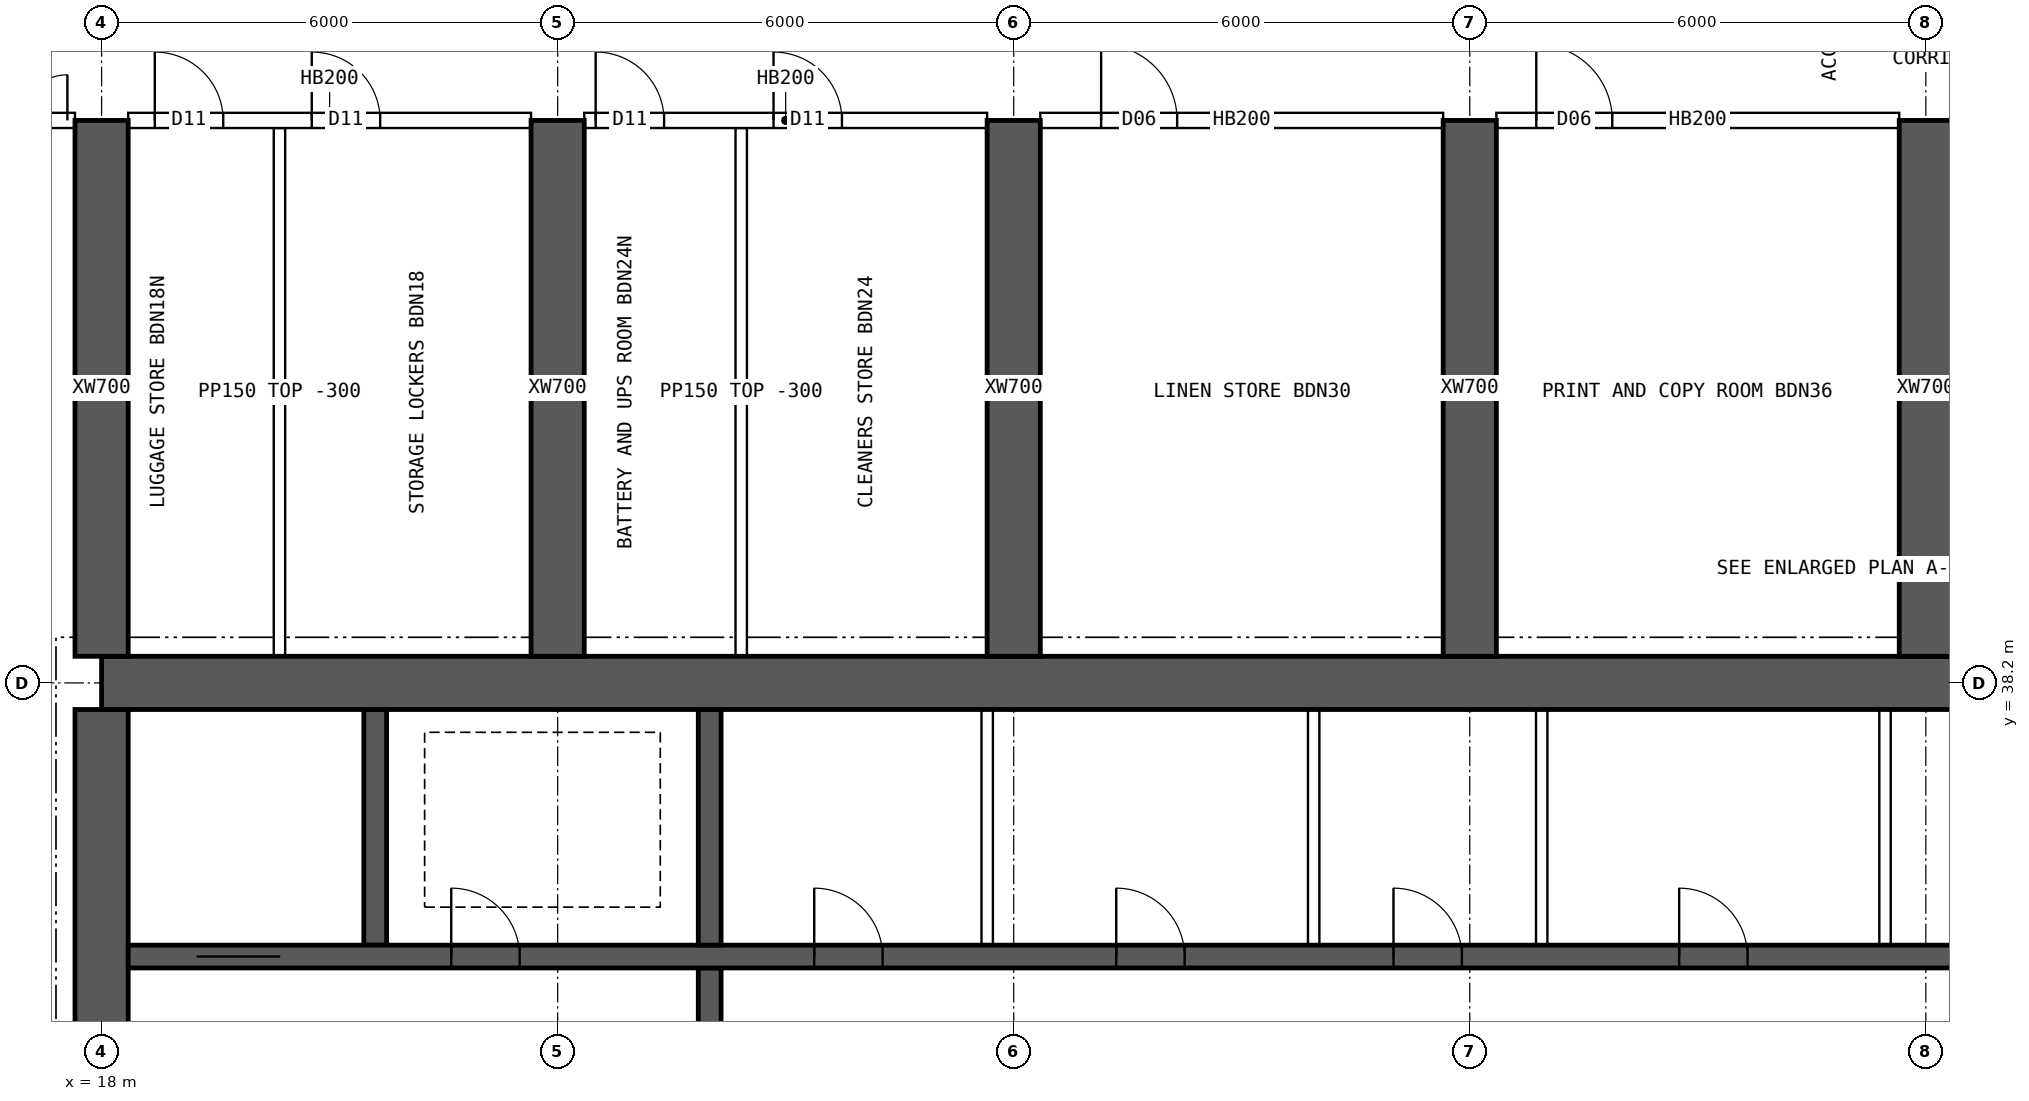
"""IFC4 building model, lengths in metres.
Left out: names, types, materials, properties, quantities, classifications, styles, units other than length and angle.
Written with IfcOpenShell. Run it as: python <this file> out.ifc"""

import sys

from ifc_helpers import new_model, si_unit, direction, frame, frame_2d, origin, place, context, subcontext, project, spatial, rectangle, extrude, element, fill, save


model = new_model("IFC4")
c1 = context("Model", 3, precision=1e-05, world=origin(), true_north=direction((0.0, 1.0)))
c2 = subcontext(c1, "Body", "Model", "MODEL_VIEW")
j1 = project(units=[si_unit("LENGTHUNIT", "METRE"), si_unit("PLANEANGLEUNIT", "RADIAN")], contexts=[c1])
p1 = place(None, origin())
s1 = spatial("IfcSite", under=j1, at=p1, CompositionType="ELEMENT")
p2 = place(p1, origin())
s2 = spatial("IfcBuilding", under=s1, at=p2, CompositionType="ELEMENT")
p3 = place(p2, frame((0.0, 0.0, 254.05)))
s3 = spatial("IfcBuildingStorey", under=s2, at=p3, CompositionType="ELEMENT", Elevation=254.05)
p4 = place(p3, frame((18.0, 38.2, 0.0), z_axis=(0.0, 0.0, 1.0), x_axis=(1.0, 0.0, 0.0)))
e1 = element("IfcWall", 1, at=p4, inside=s3, PredefinedType="SHEAR", context=c2, shape_type="SweptSolid", body=[
    extrude(rectangle(XDim=48.0, YDim=0.7, at=frame_2d((24.0, 0.0))), origin(), (0.0, 0.0, 1.0), 3.75),
])
p5 = place(p3, frame((18.0, 26.15, 0.0), z_axis=(0.0, 0.0, 1.0), x_axis=(0.0, 1.0, 0.0)))
e2 = element("IfcWall", 2, at=p5, inside=s3, PredefinedType="SHEAR", context=c2, shape_type="SweptSolid", body=[
    extrude(rectangle(XDim=11.7, YDim=0.7, at=frame_2d((5.85, 0.0))), origin(), (0.0, 0.0, 1.0), 3.75),
])
p6 = place(p5, frame((5.15, 0.0, 0.0)))
e3 = element("IfcOpeningElement", 3, at=p6, cuts=e2, PredefinedType="OPENING", context=c2, shape_type="SweptSolid", body=[
    extrude(rectangle(XDim=1.2, YDim=2.1, at=frame_2d((0.6, 1.05))), frame((0.0, 0.36, 0.0), z_axis=(0.0, -1.0, 0.0), x_axis=(1.0, 0.0, 0.0)), (0.0, 0.0, 1.0), 0.72),
])
p7 = place(p3, frame((18.35, 34.6, 0.0), z_axis=(0.0, 0.0, 1.0), x_axis=(1.0, 0.0, 0.0)))
e4 = element("IfcWall", 4, at=p7, inside=s3, PredefinedType="SHEAR", context=c2, shape_type="SweptSolid", body=[
    extrude(rectangle(XDim=47.3, YDim=0.3, at=frame_2d((23.65, 0.0))), origin(), (0.0, 0.0, 1.0), 3.75),
])
p8 = place(p7, frame((0.9, 0.0, 0.0)))
e5 = element("IfcOpeningElement", 5, at=p8, cuts=e4, PredefinedType="OPENING", context=c2, shape_type="SweptSolid", body=[
    extrude(rectangle(XDim=1.1, YDim=2.1, at=frame_2d((0.55, 1.05))), frame((0.0, 0.16, 0.0), z_axis=(0.0, -1.0, 0.0), x_axis=(1.0, 0.0, 0.0)), (0.0, 0.0, 1.0), 0.32),
])
p9 = place(p7, frame((45.3, 0.0, 0.0)))
e6 = element("IfcOpeningElement", 6, at=p9, cuts=e4, PredefinedType="OPENING", context=c2, shape_type="SweptSolid", body=[
    extrude(rectangle(XDim=1.1, YDim=2.1, at=frame_2d((0.55, 1.05))), frame((0.0, 0.16, 0.0), z_axis=(0.0, -1.0, 0.0), x_axis=(1.0, 0.0, 0.0)), (0.0, 0.0, 1.0), 0.32),
])
p10 = place(p7, frame((4.25, 0.0, 0.0)))
e7 = element("IfcOpeningElement", 7, at=p10, cuts=e4, PredefinedType="OPENING", context=c2, shape_type="SweptSolid", body=[
    extrude(rectangle(XDim=0.9, YDim=2.1, at=frame_2d((0.45, 1.05))), frame((0.0, 0.16, 0.0), z_axis=(0.0, -1.0, 0.0), x_axis=(1.0, 0.0, 0.0)), (0.0, 0.0, 1.0), 0.32),
])
p11 = place(p7, frame((42.15, 0.0, 0.0)))
e8 = element("IfcOpeningElement", 8, at=p11, cuts=e4, PredefinedType="OPENING", context=c2, shape_type="SweptSolid", body=[
    extrude(rectangle(XDim=0.9, YDim=2.1, at=frame_2d((0.45, 1.05))), frame((0.0, 0.16, 0.0), z_axis=(0.0, -1.0, 0.0), x_axis=(1.0, 0.0, 0.0)), (0.0, 0.0, 1.0), 0.32),
])
p12 = place(p7, frame((9.025, 0.0, 0.0)))
e9 = element("IfcOpeningElement", 9, at=p12, cuts=e4, PredefinedType="OPENING", context=c2, shape_type="SweptSolid", body=[
    extrude(rectangle(XDim=0.9, YDim=2.1, at=frame_2d((0.45, 1.05))), frame((0.0, 0.16, 0.0), z_axis=(0.0, -1.0, 0.0), x_axis=(1.0, 0.0, 0.0)), (0.0, 0.0, 1.0), 0.32),
])
p13 = place(p7, frame((12.999, 0.0, 0.0)))
e10 = element("IfcOpeningElement", 10, at=p13, cuts=e4, PredefinedType="OPENING", context=c2, shape_type="SweptSolid", body=[
    extrude(rectangle(XDim=0.9, YDim=2.1, at=frame_2d((0.45, 1.05))), frame((0.0, 0.16, 0.0), z_axis=(0.0, -1.0, 0.0), x_axis=(1.0, 0.0, 0.0)), (0.0, 0.0, 1.0), 0.32),
])
p14 = place(p7, frame((16.646, 0.0, 0.0)))
e11 = element("IfcOpeningElement", 11, at=p14, cuts=e4, PredefinedType="OPENING", context=c2, shape_type="SweptSolid", body=[
    extrude(rectangle(XDim=0.9, YDim=2.1, at=frame_2d((0.45, 1.05))), frame((0.0, 0.16, 0.0), z_axis=(0.0, -1.0, 0.0), x_axis=(1.0, 0.0, 0.0)), (0.0, 0.0, 1.0), 0.32),
])
p15 = place(p7, frame((20.405, 0.0, 0.0)))
e12 = element("IfcOpeningElement", 12, at=p15, cuts=e4, PredefinedType="OPENING", context=c2, shape_type="SweptSolid", body=[
    extrude(rectangle(XDim=0.9, YDim=2.1, at=frame_2d((0.45, 1.05))), frame((0.0, 0.16, 0.0), z_axis=(0.0, -1.0, 0.0), x_axis=(1.0, 0.0, 0.0)), (0.0, 0.0, 1.0), 0.32),
])
p16 = place(p7, frame((24.811, 0.0, 0.0)))
e13 = element("IfcOpeningElement", 13, at=p16, cuts=e4, PredefinedType="OPENING", context=c2, shape_type="SweptSolid", body=[
    extrude(rectangle(XDim=0.9, YDim=2.1, at=frame_2d((0.45, 1.05))), frame((0.0, 0.16, 0.0), z_axis=(0.0, -1.0, 0.0), x_axis=(1.0, 0.0, 0.0)), (0.0, 0.0, 1.0), 0.32),
])
p17 = place(p7, frame((27.608, 0.0, 0.0)))
e14 = element("IfcOpeningElement", 14, at=p17, cuts=e4, PredefinedType="OPENING", context=c2, shape_type="SweptSolid", body=[
    extrude(rectangle(XDim=0.9, YDim=2.1, at=frame_2d((0.45, 1.05))), frame((0.0, 0.16, 0.0), z_axis=(0.0, -1.0, 0.0), x_axis=(1.0, 0.0, 0.0)), (0.0, 0.0, 1.0), 0.32),
])
p18 = place(p7, frame((29.981, 0.0, 0.0)))
e15 = element("IfcOpeningElement", 15, at=p18, cuts=e4, PredefinedType="OPENING", context=c2, shape_type="SweptSolid", body=[
    extrude(rectangle(XDim=0.9, YDim=2.1, at=frame_2d((0.45, 1.05))), frame((0.0, 0.16, 0.0), z_axis=(0.0, -1.0, 0.0), x_axis=(1.0, 0.0, 0.0)), (0.0, 0.0, 1.0), 0.32),
])
p19 = place(p7, frame((35.451, 0.0, 0.0)))
e16 = element("IfcOpeningElement", 16, at=p19, cuts=e4, PredefinedType="OPENING", context=c2, shape_type="SweptSolid", body=[
    extrude(rectangle(XDim=0.9, YDim=2.1, at=frame_2d((0.45, 1.05))), frame((0.0, 0.16, 0.0), z_axis=(0.0, -1.0, 0.0), x_axis=(1.0, 0.0, 0.0)), (0.0, 0.0, 1.0), 0.32),
])
p20 = place(p3, frame((26.0, 30.55, 0.0), z_axis=(0.0, 0.0, 1.0), x_axis=(0.0, 1.0, 0.0)))
e17 = element("IfcWall", 17, at=p20, inside=s3, PredefinedType="SHEAR", context=c2, shape_type="SweptSolid", body=[
    extrude(rectangle(XDim=3.9, YDim=0.3, at=frame_2d((1.95, 0.0))), origin(), (0.0, 0.0, 1.0), 3.75),
])
p21 = place(p20, frame((1.4, 0.0, 0.0)))
e18 = element("IfcOpeningElement", 18, at=p21, cuts=e17, PredefinedType="OPENING", context=c2, shape_type="SweptSolid", body=[
    extrude(rectangle(XDim=1.2, YDim=2.1, at=frame_2d((0.6, 1.05))), frame((0.0, 0.16, 0.0), z_axis=(0.0, -1.0, 0.0), x_axis=(1.0, 0.0, 0.0)), (0.0, 0.0, 1.0), 0.32),
])
for number, where, z_axis, x_axis in (
    (19, (21.6, 34.75, 0.0), (0.0, 0.0, 1.0), (0.0, 1.0, 0.0)),
    (20, (26.0, 34.75, 0.0), (0.0, 0.0, 1.0), (0.0, 1.0, 0.0)),
):
    element("IfcWall", number, at=place(p3, frame(where, z_axis=z_axis, x_axis=x_axis)), inside=s3, PredefinedType="SHEAR", context=c2, shape_type="SweptSolid", body=[
        extrude(rectangle(XDim=3.1, YDim=0.3, at=frame_2d((1.55, 0.0))), origin(), (0.0, 0.0, 1.0), 3.75),
    ])
for number, where, z_axis, x_axis in (
    (21, (18.0, 38.55, 0.0), (0.0, 0.0, 1.0), (0.0, 1.0, 0.0)),
    (22, (24.0, 38.55, 0.0), (0.0, 0.0, 1.0), (0.0, 1.0, 0.0)),
    (23, (30.0, 38.55, 0.0), (0.0, 0.0, 1.0), (0.0, 1.0, 0.0)),
    (24, (36.0, 38.55, 0.0), (0.0, 0.0, 1.0), (0.0, 1.0, 0.0)),
    (25, (42.0, 38.55, 0.0), (0.0, 0.0, 1.0), (0.0, 1.0, 0.0)),
):
    element("IfcWall", number, at=place(p3, frame(where, z_axis=z_axis, x_axis=x_axis)), inside=s3, PredefinedType="SHEAR", context=c2, shape_type="SweptSolid", body=[
        extrude(rectangle(XDim=7.05, YDim=0.7, at=frame_2d((3.525, 0.0))), origin(), (0.0, 0.0, 1.0), 3.75),
    ])
for number, where, z_axis, x_axis in (
    (26, (29.651, 34.75, 0.0), (0.0, 0.0, 1.0), (0.0, 1.0, 0.0)),
    (27, (33.946, 34.75, 0.0), (0.0, 0.0, 1.0), (0.0, 1.0, 0.0)),
    (28, (36.946, 34.75, 0.0), (0.0, 0.0, 1.0), (0.0, 1.0, 0.0)),
    (29, (41.463, 34.75, 0.0), (0.0, 0.0, 1.0), (0.0, 1.0, 0.0)),
):
    element("IfcWall", number, at=place(p3, frame(where, z_axis=z_axis, x_axis=x_axis)), inside=s3, PredefinedType="SOLIDWALL", context=c2, shape_type="SweptSolid", body=[
        extrude(rectangle(XDim=3.1, YDim=0.15, at=frame_2d((1.55, 0.0))), origin(), (0.0, 0.0, 1.0), 3.45),
    ])
p22 = place(p3, frame((15.6, 45.6, 0.0), z_axis=(0.0, 0.0, 1.0), x_axis=(1.0, 0.0, 0.0)))
e30 = element("IfcWall", 30, at=p22, inside=s3, PredefinedType="SOLIDWALL", context=c2, shape_type="SweptSolid", body=[
    extrude(rectangle(XDim=2.05, YDim=0.2, at=frame_2d((1.025, 0.0))), origin(), (0.0, 0.0, 1.0), 3.45),
])
p23 = place(p22, frame((0.75, 0.0, 0.0)))
e31 = element("IfcOpeningElement", 31, at=p23, cuts=e30, PredefinedType="OPENING", context=c2, shape_type="SweptSolid", body=[
    extrude(rectangle(XDim=1.2, YDim=2.1, at=frame_2d((0.6, 1.05))), frame((0.0, 0.11, 0.0), z_axis=(0.0, -1.0, 0.0), x_axis=(1.0, 0.0, 0.0)), (0.0, 0.0, 1.0), 0.22),
])
p24 = place(p3, frame((18.35, 45.6, 0.0), z_axis=(0.0, 0.0, 1.0), x_axis=(1.0, 0.0, 0.0)))
e32 = element("IfcWall", 32, at=p24, inside=s3, PredefinedType="SOLIDWALL", context=c2, shape_type="SweptSolid", body=[
    extrude(rectangle(XDim=5.3, YDim=0.2, at=frame_2d((2.65, 0.0))), origin(), (0.0, 0.0, 1.0), 3.45),
])
p25 = place(p24, frame((0.35, 0.0, 0.0)))
e33 = element("IfcOpeningElement", 33, at=p25, cuts=e32, PredefinedType="OPENING", context=c2, shape_type="SweptSolid", body=[
    extrude(rectangle(XDim=0.9, YDim=2.1, at=frame_2d((0.45, 1.05))), frame((0.0, 0.11, 0.0), z_axis=(0.0, -1.0, 0.0), x_axis=(1.0, 0.0, 0.0)), (0.0, 0.0, 1.0), 0.22),
])
p26 = place(p24, frame((2.415, 0.0, 0.0)))
e34 = element("IfcOpeningElement", 34, at=p26, cuts=e32, PredefinedType="OPENING", context=c2, shape_type="SweptSolid", body=[
    extrude(rectangle(XDim=0.9, YDim=2.1, at=frame_2d((0.45, 1.05))), frame((0.0, 0.11, 0.0), z_axis=(0.0, -1.0, 0.0), x_axis=(1.0, 0.0, 0.0)), (0.0, 0.0, 1.0), 0.22),
])
p27 = place(p3, frame((24.35, 45.6, 0.0), z_axis=(0.0, 0.0, 1.0), x_axis=(1.0, 0.0, 0.0)))
e35 = element("IfcWall", 35, at=p27, inside=s3, PredefinedType="SOLIDWALL", context=c2, shape_type="SweptSolid", body=[
    extrude(rectangle(XDim=5.3, YDim=0.2, at=frame_2d((2.65, 0.0))), origin(), (0.0, 0.0, 1.0), 3.45),
])
p28 = place(p27, frame((0.15, 0.0, 0.0)))
e36 = element("IfcOpeningElement", 36, at=p28, cuts=e35, PredefinedType="OPENING", context=c2, shape_type="SweptSolid", body=[
    extrude(rectangle(XDim=0.9, YDim=2.1, at=frame_2d((0.45, 1.05))), frame((0.0, 0.11, 0.0), z_axis=(0.0, -1.0, 0.0), x_axis=(1.0, 0.0, 0.0)), (0.0, 0.0, 1.0), 0.22),
])
p29 = place(p27, frame((2.49, 0.0, 0.0)))
e37 = element("IfcOpeningElement", 37, at=p29, cuts=e35, PredefinedType="OPENING", context=c2, shape_type="SweptSolid", body=[
    extrude(rectangle(XDim=0.9, YDim=2.1, at=frame_2d((0.45, 1.05))), frame((0.0, 0.11, 0.0), z_axis=(0.0, -1.0, 0.0), x_axis=(1.0, 0.0, 0.0)), (0.0, 0.0, 1.0), 0.22),
])
p30 = place(p3, frame((30.35, 45.6, 0.0), z_axis=(0.0, 0.0, 1.0), x_axis=(1.0, 0.0, 0.0)))
e38 = element("IfcWall", 38, at=p30, inside=s3, PredefinedType="SOLIDWALL", context=c2, shape_type="SweptSolid", body=[
    extrude(rectangle(XDim=5.3, YDim=0.2, at=frame_2d((2.65, 0.0))), origin(), (0.0, 0.0, 1.0), 3.45),
])
p31 = place(p30, frame((0.8, 0.0, 0.0)))
e39 = element("IfcOpeningElement", 39, at=p31, cuts=e38, PredefinedType="OPENING", context=c2, shape_type="SweptSolid", body=[
    extrude(rectangle(XDim=1.0, YDim=2.1, at=frame_2d((0.5, 1.05))), frame((0.0, 0.11, 0.0), z_axis=(0.0, -1.0, 0.0), x_axis=(1.0, 0.0, 0.0)), (0.0, 0.0, 1.0), 0.22),
])
p32 = place(p3, frame((36.35, 45.6, 0.0), z_axis=(0.0, 0.0, 1.0), x_axis=(1.0, 0.0, 0.0)))
e40 = element("IfcWall", 40, at=p32, inside=s3, PredefinedType="SOLIDWALL", context=c2, shape_type="SweptSolid", body=[
    extrude(rectangle(XDim=5.3, YDim=0.2, at=frame_2d((2.65, 0.0))), origin(), (0.0, 0.0, 1.0), 3.45),
])
p33 = place(p32, frame((0.525, 0.0, 0.0)))
e41 = element("IfcOpeningElement", 41, at=p33, cuts=e40, PredefinedType="OPENING", context=c2, shape_type="SweptSolid", body=[
    extrude(rectangle(XDim=1.0, YDim=2.1, at=frame_2d((0.5, 1.05))), frame((0.0, 0.11, 0.0), z_axis=(0.0, -1.0, 0.0), x_axis=(1.0, 0.0, 0.0)), (0.0, 0.0, 1.0), 0.22),
])
for number, where, z_axis, x_axis in (
    (42, (20.34, 38.55, 0.0), (0.0, 0.0, 1.0), (0.0, 1.0, 0.0)),
    (43, (26.415, 38.55, 0.0), (0.0, 0.0, 1.0), (0.0, 1.0, 0.0)),
):
    element("IfcWall", number, at=place(p3, frame(where, z_axis=z_axis, x_axis=x_axis)), inside=s3, PredefinedType="PARTITIONING", context=c2, shape_type="SweptSolid", body=[
        extrude(rectangle(XDim=6.95, YDim=0.15, at=frame_2d((3.475, 0.0))), origin(), (0.0, 0.0, 1.0), 3.45),
    ])
p34 = place(p8, origin())
e44 = element("IfcDoor", 44, at=p34, inside=s3, OperationType="DOUBLE_DOOR_SLIDING", PredefinedType="DOOR", context=c2, shape_type="SweptSolid", body=[
    extrude(rectangle(XDim=1.1, YDim=2.1, at=frame_2d((0.55, 1.05))), frame((0.0, 0.025, 0.0), z_axis=(0.0, -1.0, 0.0), x_axis=(1.0, 0.0, 0.0)), (0.0, 0.0, 1.0), 0.05),
])
fill(e5, e44)
p35 = place(p10, origin())
e45 = element("IfcDoor", 45, at=p35, inside=s3, OperationType="SINGLE_SWING_LEFT", PredefinedType="DOOR", context=c2, shape_type="SweptSolid", body=[
    extrude(rectangle(XDim=0.9, YDim=2.1, at=frame_2d((0.45, 1.05))), frame((0.0, 0.025, 0.0), z_axis=(0.0, -1.0, 0.0), x_axis=(1.0, 0.0, 0.0)), (0.0, 0.0, 1.0), 0.05),
])
fill(e7, e45)
p36 = place(p12, origin())
e46 = element("IfcDoor", 46, at=p36, inside=s3, OperationType="SINGLE_SWING_LEFT", PredefinedType="DOOR", context=c2, shape_type="SweptSolid", body=[
    extrude(rectangle(XDim=0.9, YDim=2.1, at=frame_2d((0.45, 1.05))), frame((0.0, 0.025, 0.0), z_axis=(0.0, -1.0, 0.0), x_axis=(1.0, 0.0, 0.0)), (0.0, 0.0, 1.0), 0.05),
])
fill(e9, e46)
p37 = place(p13, origin())
e47 = element("IfcDoor", 47, at=p37, inside=s3, OperationType="SINGLE_SWING_LEFT", PredefinedType="DOOR", context=c2, shape_type="SweptSolid", body=[
    extrude(rectangle(XDim=0.9, YDim=2.1, at=frame_2d((0.45, 1.05))), frame((0.0, 0.025, 0.0), z_axis=(0.0, -1.0, 0.0), x_axis=(1.0, 0.0, 0.0)), (0.0, 0.0, 1.0), 0.05),
])
fill(e10, e47)
p38 = place(p14, origin())
e48 = element("IfcDoor", 48, at=p38, inside=s3, OperationType="SINGLE_SWING_LEFT", PredefinedType="DOOR", context=c2, shape_type="SweptSolid", body=[
    extrude(rectangle(XDim=0.9, YDim=2.1, at=frame_2d((0.45, 1.05))), frame((0.0, 0.025, 0.0), z_axis=(0.0, -1.0, 0.0), x_axis=(1.0, 0.0, 0.0)), (0.0, 0.0, 1.0), 0.05),
])
fill(e11, e48)
p39 = place(p15, origin())
e49 = element("IfcDoor", 49, at=p39, inside=s3, OperationType="SINGLE_SWING_LEFT", PredefinedType="DOOR", context=c2, shape_type="SweptSolid", body=[
    extrude(rectangle(XDim=0.9, YDim=2.1, at=frame_2d((0.45, 1.05))), frame((0.0, 0.025, 0.0), z_axis=(0.0, -1.0, 0.0), x_axis=(1.0, 0.0, 0.0)), (0.0, 0.0, 1.0), 0.05),
])
fill(e12, e49)
p40 = place(p23, origin())
e50 = element("IfcDoor", 50, at=p40, inside=s3, OperationType="DOUBLE_DOOR_SINGLE_SWING", PredefinedType="DOOR", context=c2, shape_type="SweptSolid", body=[
    extrude(rectangle(XDim=1.2, YDim=2.1, at=frame_2d((0.6, 1.05))), frame((0.0, 0.025, 0.0), z_axis=(0.0, -1.0, 0.0), x_axis=(1.0, 0.0, 0.0)), (0.0, 0.0, 1.0), 0.05),
])
fill(e31, e50)
p41 = place(p25, origin())
e51 = element("IfcDoor", 51, at=p41, inside=s3, OperationType="SINGLE_SWING_LEFT", PredefinedType="DOOR", context=c2, shape_type="SweptSolid", body=[
    extrude(rectangle(XDim=0.9, YDim=2.1, at=frame_2d((0.45, 1.05))), frame((0.0, 0.025, 0.0), z_axis=(0.0, -1.0, 0.0), x_axis=(1.0, 0.0, 0.0)), (0.0, 0.0, 1.0), 0.05),
])
fill(e33, e51)
p42 = place(p26, origin())
e52 = element("IfcDoor", 52, at=p42, inside=s3, OperationType="SINGLE_SWING_LEFT", PredefinedType="DOOR", context=c2, shape_type="SweptSolid", body=[
    extrude(rectangle(XDim=0.9, YDim=2.1, at=frame_2d((0.45, 1.05))), frame((0.0, 0.025, 0.0), z_axis=(0.0, -1.0, 0.0), x_axis=(1.0, 0.0, 0.0)), (0.0, 0.0, 1.0), 0.05),
])
fill(e34, e52)
p43 = place(p28, origin())
e53 = element("IfcDoor", 53, at=p43, inside=s3, OperationType="SINGLE_SWING_LEFT", PredefinedType="DOOR", context=c2, shape_type="SweptSolid", body=[
    extrude(rectangle(XDim=0.9, YDim=2.1, at=frame_2d((0.45, 1.05))), frame((0.0, 0.025, 0.0), z_axis=(0.0, -1.0, 0.0), x_axis=(1.0, 0.0, 0.0)), (0.0, 0.0, 1.0), 0.05),
])
fill(e36, e53)
p44 = place(p29, origin())
e54 = element("IfcDoor", 54, at=p44, inside=s3, OperationType="SINGLE_SWING_LEFT", PredefinedType="DOOR", context=c2, shape_type="SweptSolid", body=[
    extrude(rectangle(XDim=0.9, YDim=2.1, at=frame_2d((0.45, 1.05))), frame((0.0, 0.025, 0.0), z_axis=(0.0, -1.0, 0.0), x_axis=(1.0, 0.0, 0.0)), (0.0, 0.0, 1.0), 0.05),
])
fill(e37, e54)
p45 = place(p31, origin())
e55 = element("IfcDoor", 55, at=p45, inside=s3, OperationType="SINGLE_SWING_LEFT", PredefinedType="DOOR", context=c2, shape_type="SweptSolid", body=[
    extrude(rectangle(XDim=1.0, YDim=2.1, at=frame_2d((0.5, 1.05))), frame((0.0, 0.025, 0.0), z_axis=(0.0, -1.0, 0.0), x_axis=(1.0, 0.0, 0.0)), (0.0, 0.0, 1.0), 0.05),
])
fill(e39, e55)
p46 = place(p33, origin())
e56 = element("IfcDoor", 56, at=p46, inside=s3, OperationType="SINGLE_SWING_LEFT", PredefinedType="DOOR", context=c2, shape_type="SweptSolid", body=[
    extrude(rectangle(XDim=1.0, YDim=2.1, at=frame_2d((0.5, 1.05))), frame((0.0, 0.025, 0.0), z_axis=(0.0, -1.0, 0.0), x_axis=(1.0, 0.0, 0.0)), (0.0, 0.0, 1.0), 0.05),
])
fill(e41, e56)
save(model, sys.argv[1])
